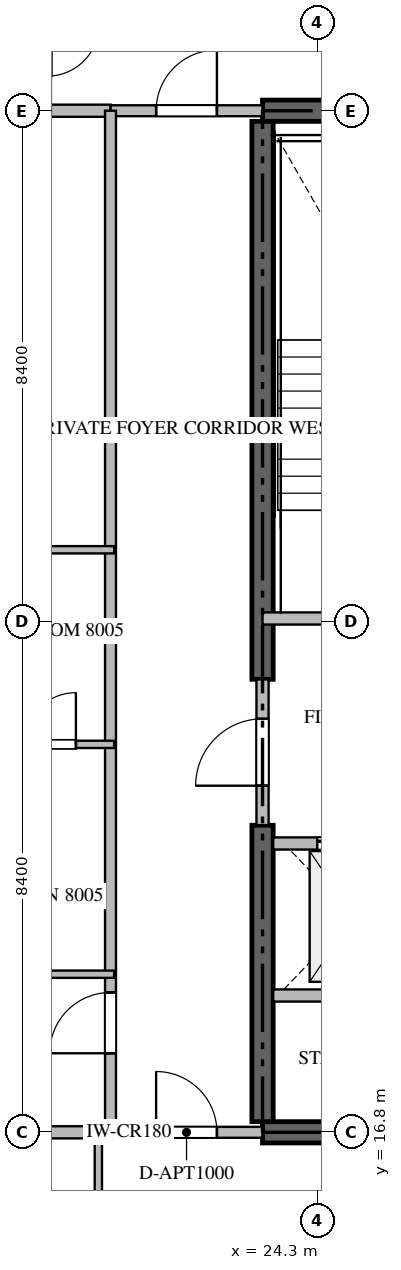
"""IFC4 building model, lengths in metres.
Left out: names, types, materials, properties, quantities, classifications, styles, units other than length and angle.
Written with IfcOpenShell. Run it as: python <this file> out.ifc"""

import sys

from ifc_helpers import new_model, si_unit, direction, frame, frame_2d, origin, place, context, subcontext, project, spatial, rectangle, extrude, source, transform, mapped, element, fill, save


model = new_model("IFC4")
c1 = context("Model", 3, precision=1e-05, world=origin(), true_north=direction((0.0, 1.0)))
c2 = subcontext(c1, "Body", "Model", "MODEL_VIEW")
j1 = project(units=[si_unit("LENGTHUNIT", "METRE"), si_unit("PLANEANGLEUNIT", "RADIAN")], contexts=[c1])
p1 = place(None, origin())
s1 = spatial("IfcSite", under=j1, at=p1, CompositionType="ELEMENT")
p2 = place(p1, origin())
s2 = spatial("IfcBuilding", under=s1, at=p2, CompositionType="ELEMENT")
p3 = place(p2, frame((0.0, 0.0, 321.8)))
s3 = spatial("IfcBuildingStorey", under=s2, at=p3, CompositionType="ELEMENT", Elevation=321.8)
for number, where, z_axis, x_axis in (
    (1, (23.4, 16.8, -0.26), (0.0, 0.0, 1.0), (1.0, 0.0, 0.0)),
    (2, (41.4, 33.6, -0.26), (0.0, 0.0, 1.0), (-1.0, 0.0, 0.0)),
):
    element("IfcWall", number, at=place(p3, frame(where, z_axis=z_axis, x_axis=x_axis)), inside=s3, PredefinedType="SHEAR", context=c2, shape_type="SweptSolid", body=[
        extrude(rectangle(XDim=18.0, YDim=0.35, at=frame_2d((9.0, 0.0))), origin(), (0.0, 0.0, 1.0), 4.048),
    ])
p4 = place(p3, frame((23.4, 16.975, -0.26), z_axis=(0.0, 0.0, 1.0), x_axis=(0.0, 1.0, 0.0)))
e3 = element("IfcWall", 3, at=p4, inside=s3, PredefinedType="SHEAR", context=c2, shape_type="SweptSolid", body=[
    extrude(rectangle(XDim=4.875, YDim=0.35, at=frame_2d((2.438, 0.0))), origin(), (0.0, 0.0, 1.0), 4.048),
])
p5 = place(p3, frame((23.4, 24.25, -0.26), z_axis=(0.0, 0.0, 1.0), x_axis=(0.0, 1.0, 0.0)))
e4 = element("IfcWall", 4, at=p5, inside=s3, PredefinedType="SHEAR", context=c2, shape_type="SweptSolid", body=[
    extrude(rectangle(XDim=9.175, YDim=0.35, at=frame_2d((4.587, 0.0))), origin(), (0.0, 0.0, 1.0), 4.048),
])
p6 = place(p3, frame((23.4, 25.25, 0.0), z_axis=(0.0, 0.0, 1.0), x_axis=(1.0, 0.0, 0.0)))
e5 = element("IfcWall", 5, at=p6, inside=s3, PredefinedType="STANDARD", context=c2, shape_type="SweptSolid", body=[
    extrude(rectangle(XDim=4.45, YDim=0.2, at=frame_2d((2.225, 0.0))), origin(), (0.0, 0.0, 1.0), 3.79),
])
p7 = place(p6, frame((1.65, 0.0, 0.0)))
e6 = element("IfcOpeningElement", 6, at=p7, cuts=e5, PredefinedType="OPENING", context=c2, shape_type="SweptSolid", body=[
    extrude(rectangle(XDim=1.1, YDim=2.15, at=frame_2d((0.55, 1.075))), frame((0.0, 0.11, 0.0), z_axis=(0.0, -1.0, 0.0), x_axis=(1.0, 0.0, 0.0)), (0.0, 0.0, 1.0), 0.22),
])
p8 = place(p3, frame((23.575, 21.55, 0.0), z_axis=(0.0, 0.0, 1.0), x_axis=(1.0, 0.0, 0.0)))
e7 = element("IfcWall", 7, at=p8, inside=s3, PredefinedType="STANDARD", context=c2, shape_type="SweptSolid", body=[
    extrude(rectangle(XDim=2.475, YDim=0.2, at=frame_2d((1.238, 0.0))), origin(), (0.0, 0.0, 1.0), 3.79),
])
p9 = place(p8, frame((0.725, 0.0, 0.0)))
e8 = element("IfcOpeningElement", 8, at=p9, cuts=e7, PredefinedType="OPENING", context=c2, shape_type="SweptSolid", body=[
    extrude(rectangle(XDim=1.2, YDim=2.2, at=frame_2d((0.6, 1.1))), frame((0.0, 0.11, 0.0), z_axis=(0.0, -1.0, 0.0), x_axis=(1.0, 0.0, 0.0)), (0.0, 0.0, 1.0), 0.22),
])
p10 = place(p3, frame((23.575, 19.05, 0.0), z_axis=(0.0, 0.0, 1.0), x_axis=(1.0, 0.0, 0.0)))
e9 = element("IfcWall", 9, at=p10, inside=s3, PredefinedType="STANDARD", context=c2, shape_type="SweptSolid", body=[
    extrude(rectangle(XDim=2.475, YDim=0.2, at=frame_2d((1.238, 0.0))), origin(), (0.0, 0.0, 1.0), 3.79),
])
p11 = place(p3, frame((23.4, 21.852, 0.0), z_axis=(0.0, 0.0, 1.0), x_axis=(0.0, 1.0, 0.0)))
e10 = element("IfcWall", 10, at=p11, inside=s3, PredefinedType="STANDARD", context=c2, shape_type="SweptSolid", body=[
    extrude(rectangle(XDim=2.396, YDim=0.2, at=frame_2d((1.198, 0.0))), origin(), (0.0, 0.0, 1.0), 3.79),
])
p12 = place(p11, frame((0.648, 0.0, 0.0)))
e11 = element("IfcOpeningElement", 11, at=p12, cuts=e10, PredefinedType="OPENING", context=c2, shape_type="SweptSolid", body=[
    extrude(rectangle(XDim=1.1, YDim=2.15, at=frame_2d((0.55, 1.075))), frame((0.0, 0.11, 0.0), z_axis=(0.0, -1.0, 0.0), x_axis=(1.0, 0.0, 0.0)), (0.0, 0.0, 1.0), 0.22),
])
for number, where, z_axis, x_axis in (
    (12, (9.282, 16.8, 0.0), (0.0, 0.0, 1.0), (1.0, 0.0, 0.0)),
    (13, (9.282, 33.6, 0.0), (0.0, 0.0, 1.0), (1.0, 0.0, 0.0)),
):
    element("IfcWall", number, at=place(p3, frame(where, z_axis=z_axis, x_axis=x_axis)), inside=s3, PredefinedType="PARTITIONING", context=c2, shape_type="SweptSolid", body=[
        extrude(rectangle(XDim=11.618, YDim=0.2, at=frame_2d((5.809, 0.0))), origin(), (0.0, 0.0, 1.0), 3.79),
    ])
p13 = place(p3, frame((20.902, 16.8, 0.0), z_axis=(0.0, 0.0, 1.0), x_axis=(1.0, 0.0, 0.0)))
e14 = element("IfcWall", 14, at=p13, inside=s3, PredefinedType="PARTITIONING", context=c2, shape_type="SweptSolid", body=[
    extrude(rectangle(XDim=2.496, YDim=0.18, at=frame_2d((1.248, 0.0))), origin(), (0.0, 0.0, 1.0), 3.79),
])
p14 = place(p13, frame((0.748, 0.0, 0.0)))
e15 = element("IfcOpeningElement", 15, at=p14, cuts=e14, PredefinedType="OPENING", context=c2, shape_type="SweptSolid", body=[
    extrude(rectangle(XDim=1.0, YDim=2.15, at=frame_2d((0.5, 1.075))), frame((0.0, 0.1, 0.0), z_axis=(0.0, -1.0, 0.0), x_axis=(1.0, 0.0, 0.0)), (0.0, 0.0, 1.0), 0.2),
])
p15 = place(p3, frame((20.902, 33.6, 0.0), z_axis=(0.0, 0.0, 1.0), x_axis=(1.0, 0.0, 0.0)))
e16 = element("IfcWall", 16, at=p15, inside=s3, PredefinedType="PARTITIONING", context=c2, shape_type="SweptSolid", body=[
    extrude(rectangle(XDim=2.496, YDim=0.18, at=frame_2d((1.248, 0.0))), origin(), (0.0, 0.0, 1.0), 3.79),
])
p16 = place(p15, frame((0.748, 0.0, 0.0)))
e17 = element("IfcOpeningElement", 17, at=p16, cuts=e16, PredefinedType="OPENING", context=c2, shape_type="SweptSolid", body=[
    extrude(rectangle(XDim=1.0, YDim=2.15, at=frame_2d((0.5, 1.075))), frame((0.0, 0.1, 0.0), z_axis=(0.0, -1.0, 0.0), x_axis=(1.0, 0.0, 0.0)), (0.0, 0.0, 1.0), 0.2),
])
p17 = place(p3, frame((20.9, 16.8, 0.0), z_axis=(0.0, 0.0, 1.0), x_axis=(0.0, 1.0, 0.0)))
e18 = element("IfcWall", 18, at=p17, inside=s3, PredefinedType="PARTITIONING", context=c2, shape_type="SweptSolid", body=[
    extrude(rectangle(XDim=16.8, YDim=0.18, at=frame_2d((8.4, 0.0))), origin(), (0.0, 0.0, 1.0), 3.79),
])
p18 = place(p17, frame((1.3, 0.0, 0.0)))
e19 = element("IfcOpeningElement", 19, at=p18, cuts=e18, PredefinedType="OPENING", context=c2, shape_type="SweptSolid", body=[
    extrude(rectangle(XDim=1.0, YDim=2.15, at=frame_2d((0.5, 1.075))), frame((0.0, 0.1, 0.0), z_axis=(0.0, -1.0, 0.0), x_axis=(1.0, 0.0, 0.0)), (0.0, 0.0, 1.0), 0.2),
])
for number, where, z_axis, x_axis in (
    (20, (20.7, 14.05, 0.0), (0.0, 0.0, 1.0), (0.0, 1.0, 0.0)),
    (21, (18.15, 19.4, 0.0), (0.0, 0.0, 1.0), (1.0, 0.0, 0.0)),
):
    element("IfcWall", number, at=place(p3, frame(where, z_axis=z_axis, x_axis=x_axis)), inside=s3, PredefinedType="PARTITIONING", context=c2, shape_type="SweptSolid", body=[
        extrude(rectangle(XDim=2.81, YDim=0.12, at=frame_2d((1.405, 0.0))), origin(), (0.0, 0.0, 1.0), 3.79),
    ])
p19 = place(p3, frame((18.85, 26.38, 0.0), z_axis=(0.0, 0.0, 1.0), x_axis=(1.0, 0.0, 0.0)))
e22 = element("IfcWall", 22, at=p19, inside=s3, PredefinedType="PARTITIONING", context=c2, shape_type="SweptSolid", body=[
    extrude(rectangle(XDim=2.11, YDim=0.12, at=frame_2d((1.055, 0.0))), origin(), (0.0, 0.0, 1.0), 3.79),
])
p20 = place(p3, frame((18.852, 23.18, 0.0), z_axis=(0.0, 0.0, 1.0), x_axis=(1.0, 0.0, 0.0)))
e23 = element("IfcWall", 23, at=p20, inside=s3, PredefinedType="PARTITIONING", context=c2, shape_type="SweptSolid", body=[
    extrude(rectangle(XDim=2.108, YDim=0.12, at=frame_2d((1.054, 0.0))), origin(), (0.0, 0.0, 1.0), 3.79),
])
p21 = place(p20, frame((0.629, 0.0, 0.0)))
e24 = element("IfcOpeningElement", 24, at=p21, cuts=e23, PredefinedType="OPENING", context=c2, shape_type="SweptSolid", body=[
    extrude(rectangle(XDim=0.85, YDim=2.1, at=frame_2d((0.425, 1.05))), frame((0.0, 0.07, 0.0), z_axis=(0.0, -1.0, 0.0), x_axis=(1.0, 0.0, 0.0)), (0.0, 0.0, 1.0), 0.14),
])
m1 = source(origin(), c2, "Body", "SweptSolid", [
    extrude(rectangle(XDim=1.2, YDim=2.2, at=frame_2d((0.6, 1.1))), frame((0.0, 0.025, 0.0), z_axis=(0.0, -1.0, 0.0), x_axis=(1.0, 0.0, 0.0)), (0.0, 0.0, 1.0), 0.05),
])
p22 = place(p9, origin())
e25 = element("IfcDoor", 25, at=p22, inside=s3, OperationType="DOUBLE_DOOR_SLIDING", PredefinedType="DOOR", context=c2, shape_type="MappedRepresentation", body=[
    mapped(m1, transform((0.0, 0.0, 0.0), scale=1.0)),
])
fill(e8, e25)
m2 = source(origin(), c2, "Body", "SweptSolid", [
    extrude(rectangle(XDim=1.1, YDim=2.15, at=frame_2d((0.55, 1.075))), frame((0.0, 0.025, 0.0), z_axis=(0.0, -1.0, 0.0), x_axis=(1.0, 0.0, 0.0)), (0.0, 0.0, 1.0), 0.05),
])
p23 = place(p12, origin())
e26 = element("IfcDoor", 26, at=p23, inside=s3, OperationType="SINGLE_SWING_LEFT", PredefinedType="DOOR", context=c2, shape_type="MappedRepresentation", body=[
    mapped(m2, transform((0.0, 0.0, 0.0), scale=1.0)),
])
fill(e11, e26)
m3 = source(origin(), c2, "Body", "SweptSolid", [
    extrude(rectangle(XDim=1.0, YDim=2.15, at=frame_2d((0.5, 1.075))), frame((0.0, 0.025, 0.0), z_axis=(0.0, -1.0, 0.0), x_axis=(1.0, 0.0, 0.0)), (0.0, 0.0, 1.0), 0.05),
])
p24 = place(p14, origin())
e27 = element("IfcDoor", 27, at=p24, inside=s3, OperationType="SINGLE_SWING_LEFT", PredefinedType="DOOR", context=c2, shape_type="MappedRepresentation", body=[
    mapped(m3, transform((0.0, 0.0, 0.0), scale=1.0)),
])
fill(e15, e27)
p25 = place(p16, origin())
e28 = element("IfcDoor", 28, at=p25, inside=s3, OperationType="SINGLE_SWING_RIGHT", PredefinedType="DOOR", context=c2, shape_type="MappedRepresentation", body=[
    mapped(m3, transform((0.0, 0.0, 0.0), scale=1.0)),
])
fill(e17, e28)
p26 = place(p18, origin())
e29 = element("IfcDoor", 29, at=p26, inside=s3, OperationType="SINGLE_SWING_LEFT", PredefinedType="DOOR", context=c2, shape_type="MappedRepresentation", body=[
    mapped(m3, transform((0.0, 0.0, 0.0), scale=1.0)),
])
fill(e19, e29)
m4 = source(origin(), c2, "Body", "SweptSolid", [
    extrude(rectangle(XDim=0.85, YDim=2.1, at=frame_2d((0.425, 1.05))), frame((0.0, 0.025, 0.0), z_axis=(0.0, -1.0, 0.0), x_axis=(1.0, 0.0, 0.0)), (0.0, 0.0, 1.0), 0.05),
])
p27 = place(p21, origin())
e30 = element("IfcDoor", 30, at=p27, inside=s3, OperationType="SINGLE_SWING_RIGHT", PredefinedType="DOOR", context=c2, shape_type="MappedRepresentation", body=[
    mapped(m4, transform((0.0, 0.0, 0.0), scale=1.0)),
])
fill(e24, e30)
save(model, sys.argv[1])
